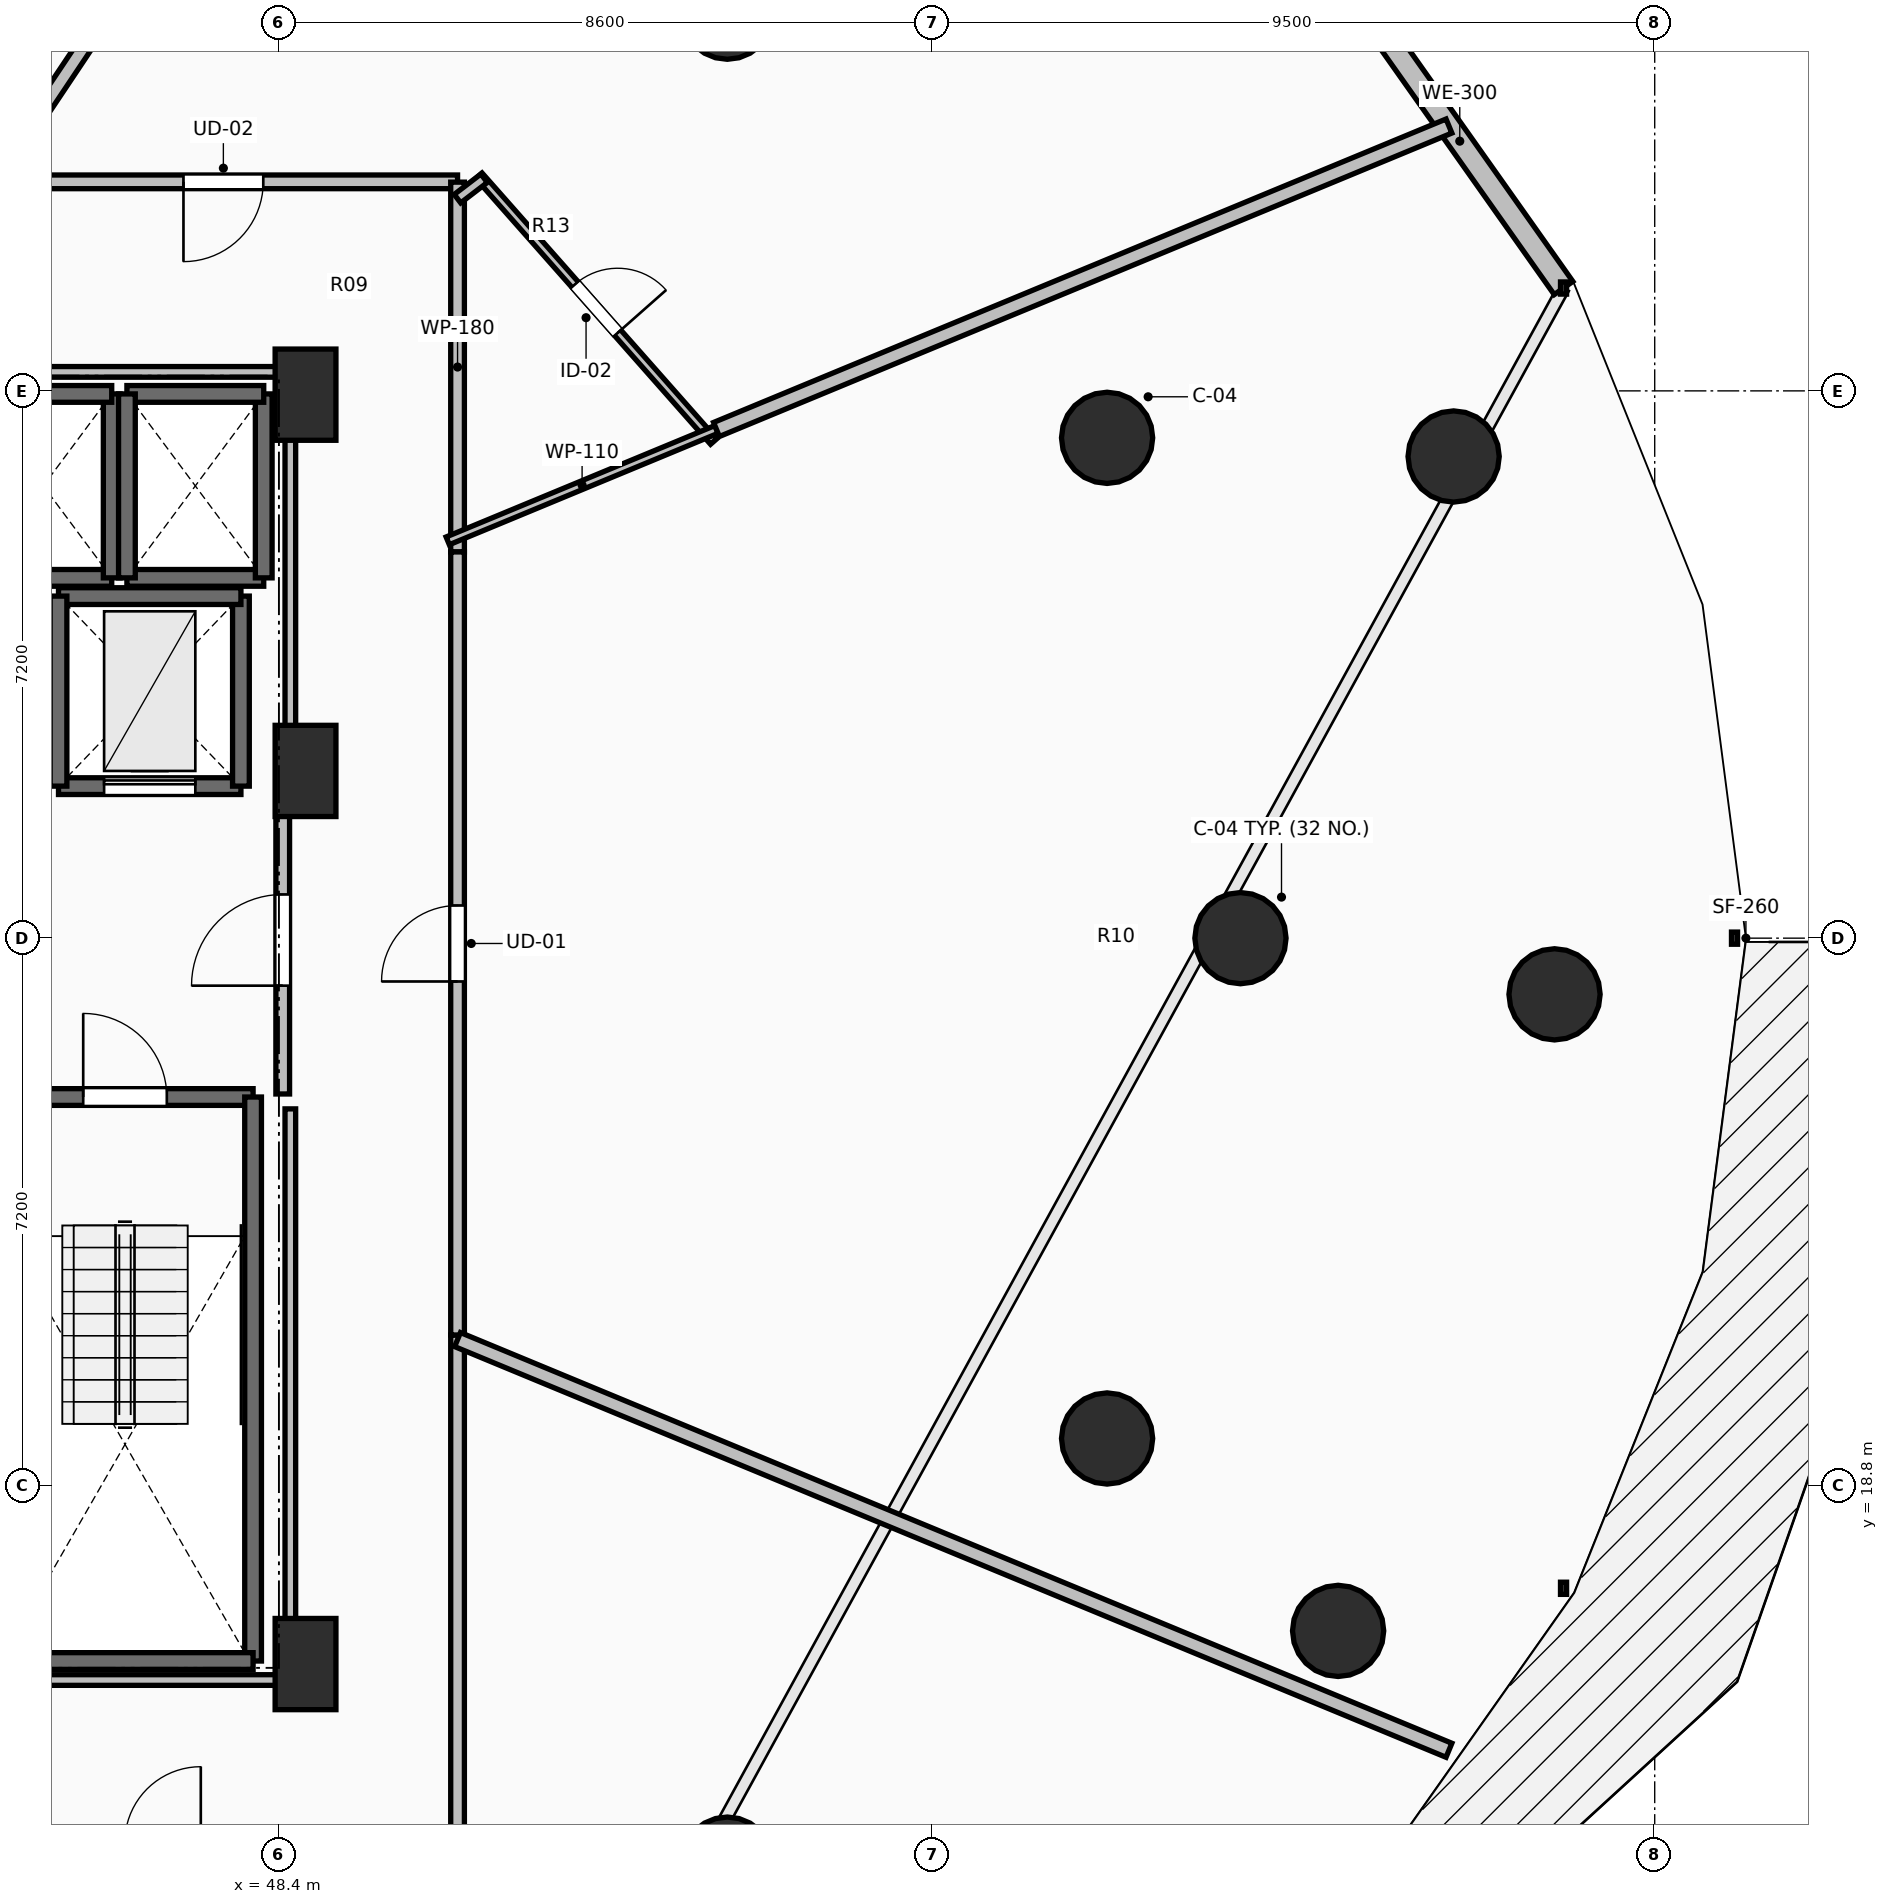
"""IFC4 building model, lengths in metres.
Left out: names, types, materials, properties, quantities, classifications, styles, units other than length and angle.
Written with IfcOpenShell. Run it as: python <this file> out.ifc"""

import sys

from ifc_helpers import new_model, si_unit, direction, frame, frame_2d, origin, origin_2d, place, context, subcontext, project, spatial, rectangle, circle, extrude, element, fill, save


model = new_model("IFC4")
c1 = context("Model", 3, precision=1e-05, world=origin(), true_north=direction((0.0, 1.0)))
c2 = subcontext(c1, "Body", "Model", "MODEL_VIEW")
j1 = project(units=[si_unit("LENGTHUNIT", "METRE"), si_unit("PLANEANGLEUNIT", "RADIAN")], contexts=[c1])
p1 = place(None, origin())
s1 = spatial("IfcSite", under=j1, at=p1, CompositionType="ELEMENT")
p2 = place(p1, origin())
s2 = spatial("IfcBuilding", under=s1, at=p2, CompositionType="ELEMENT")
p3 = place(p2, frame((0.0, 0.0, 48.5)))
s3 = spatial("IfcBuildingStorey", under=s2, at=p3, CompositionType="ELEMENT", Elevation=48.5)
for number, where, z_axis, x_axis in (
    (1, (61.05, 26.0, 0.0), (0.0, 0.0, 1.0), (1.0, 0.0, 0.0)),
    (2, (59.295, 32.582, 0.0), (0.0, 0.0, 1.0), (0.924, 0.383, 0.0)),
    (3, (54.299, 38.162, 0.0), (0.0, 0.0, 1.0), (0.707, 0.707, 0.0)),
    (4, (54.299, 13.838, 0.0), (0.0, 0.0, 1.0), (0.707, -0.707, 0.0)),
    (5, (59.295, 19.418, 0.0), (0.0, 0.0, 1.0), (0.924, -0.383, 0.0)),
    (6, (65.182, 25.261, 0.0), (0.0, 0.0, 1.0), (1.0, 0.0, 0.0)),
    (7, (63.854, 32.337, 0.0), (0.0, 0.0, 1.0), (0.924, 0.383, 0.0)),
    (8, (62.335, 16.886, 0.0), (0.0, 0.0, 1.0), (0.924, -0.383, 0.0)),
):
    element("IfcColumn", number, at=place(p3, frame(where, z_axis=z_axis, x_axis=x_axis)), inside=s3, PredefinedType="COLUMN", context=c2, shape_type="SweptSolid", body=[
        extrude(circle(Radius=0.6, at=origin_2d()), origin(), (0.0, 0.0, 1.0), 3.5),
    ])
for number, where, z_axis, x_axis in (
    (9, (48.75, 33.15, 0.0), (0.0, 0.0, 1.0), (1.0, 0.0, 0.0)),
    (10, (48.75, 28.2, 0.0), (0.0, 0.0, 1.0), (1.0, 0.0, 0.0)),
    (11, (48.75, 16.45, 0.0), (0.0, 0.0, 1.0), (1.0, 0.0, 0.0)),
):
    element("IfcColumn", number, at=place(p3, frame(where, z_axis=z_axis, x_axis=x_axis)), inside=s3, PredefinedType="PILASTER", context=c2, shape_type="SweptSolid", body=[
        extrude(rectangle(XDim=0.8, YDim=1.2, at=origin_2d()), origin(), (0.0, 0.0, 1.0), 3.5),
    ])
p4 = place(p3, frame((65.301, 34.553, 0.0), z_axis=(0.0, 0.0, 1.0), x_axis=(-0.577130815624, 0.816651713803, 0.0)))
e12 = element("IfcWall", 12, at=p4, inside=s3, PredefinedType="STANDARD", context=c2, shape_type="SweptSolid", body=[
    extrude(rectangle(XDim=4.731, YDim=0.3, at=frame_2d((2.366, 0.0))), origin(), (0.0, 0.0, 1.0), 3.24),
])
p5 = place(p3, frame((44.69, 23.91, 0.0), z_axis=(0.0, 0.0, 1.0), x_axis=(1.0, 0.0, 0.0)))
e13 = element("IfcWall", 13, at=p5, inside=s3, PredefinedType="SOLIDWALL", context=c2, shape_type="SweptSolid", body=[
    extrude(rectangle(XDim=3.37, YDim=0.22, at=frame_2d((1.685, 0.0))), origin(), (0.0, 0.0, 1.0), 3.24),
])
p6 = place(p5, frame((1.135, 0.0, 0.0)))
e14 = element("IfcOpeningElement", 14, at=p6, cuts=e13, PredefinedType="OPENING", context=c2, shape_type="SweptSolid", body=[
    extrude(rectangle(XDim=1.1, YDim=2.15, at=frame_2d((0.55, 1.075))), frame((0.0, 0.125, 0.0), z_axis=(0.0, -1.0, 0.0), x_axis=(1.0, 0.0, 0.0)), (0.0, 0.0, 1.0), 0.25),
])
p7 = place(p3, frame((48.06, 23.91, 0.0), z_axis=(0.0, 0.0, 1.0), x_axis=(0.0, -1.0, 0.0)))
e15 = element("IfcWall", 15, at=p7, inside=s3, PredefinedType="SOLIDWALL", context=c2, shape_type="SweptSolid", body=[
    extrude(rectangle(XDim=7.42, YDim=0.22, at=frame_2d((3.71, 0.0))), origin(), (0.0, 0.0, 1.0), 3.24),
])
p8 = place(p3, frame((48.06, 16.49, 0.0), z_axis=(0.0, 0.0, 1.0), x_axis=(-1.0, 0.0, 0.0)))
e16 = element("IfcWall", 16, at=p8, inside=s3, PredefinedType="SOLIDWALL", context=c2, shape_type="SweptSolid", body=[
    extrude(rectangle(XDim=3.37, YDim=0.22, at=frame_2d((1.685, 0.0))), origin(), (0.0, 0.0, 1.0), 3.24),
])
p9 = place(p3, frame((44.4, 30.74, 0.0), z_axis=(0.0, 0.0, 1.0), x_axis=(1.0, 0.0, 0.0)))
e17 = element("IfcWall", 17, at=p9, inside=s3, PredefinedType="SOLIDWALL", context=c2, shape_type="SweptSolid", body=[
    extrude(rectangle(XDim=1.8, YDim=0.22, at=frame_2d((0.9, 0.0))), origin(), (0.0, 0.0, 1.0), 3.24),
])
p10 = place(p3, frame((46.2, 30.74, 0.0), z_axis=(0.0, 0.0, 1.0), x_axis=(0.0, 1.0, 0.0)))
e18 = element("IfcWall", 18, at=p10, inside=s3, PredefinedType="SOLIDWALL", context=c2, shape_type="SweptSolid", body=[
    extrude(rectangle(XDim=2.42, YDim=0.22, at=frame_2d((1.21, 0.0))), origin(), (0.0, 0.0, 1.0), 3.24),
])
for number, where, z_axis, x_axis in (
    (19, (46.2, 33.16, 0.0), (0.0, 0.0, 1.0), (-1.0, 0.0, 0.0)),
    (20, (46.4, 30.74, 0.0), (0.0, 0.0, 1.0), (1.0, 0.0, 0.0)),
):
    element("IfcWall", number, at=place(p3, frame(where, z_axis=z_axis, x_axis=x_axis)), inside=s3, PredefinedType="SOLIDWALL", context=c2, shape_type="SweptSolid", body=[
        extrude(rectangle(XDim=1.8, YDim=0.22, at=frame_2d((0.9, 0.0))), origin(), (0.0, 0.0, 1.0), 3.24),
    ])
p11 = place(p3, frame((48.2, 30.74, 0.0), z_axis=(0.0, 0.0, 1.0), x_axis=(0.0, 1.0, 0.0)))
e21 = element("IfcWall", 21, at=p11, inside=s3, PredefinedType="SOLIDWALL", context=c2, shape_type="SweptSolid", body=[
    extrude(rectangle(XDim=2.42, YDim=0.22, at=frame_2d((1.21, 0.0))), origin(), (0.0, 0.0, 1.0), 3.24),
])
p12 = place(p3, frame((48.2, 33.16, 0.0), z_axis=(0.0, 0.0, 1.0), x_axis=(-1.0, 0.0, 0.0)))
e22 = element("IfcWall", 22, at=p12, inside=s3, PredefinedType="SOLIDWALL", context=c2, shape_type="SweptSolid", body=[
    extrude(rectangle(XDim=1.8, YDim=0.22, at=frame_2d((0.9, 0.0))), origin(), (0.0, 0.0, 1.0), 3.24),
])
p13 = place(p3, frame((46.4, 33.16, 0.0), z_axis=(0.0, 0.0, 1.0), x_axis=(0.0, -1.0, 0.0)))
e23 = element("IfcWall", 23, at=p13, inside=s3, PredefinedType="SOLIDWALL", context=c2, shape_type="SweptSolid", body=[
    extrude(rectangle(XDim=2.42, YDim=0.22, at=frame_2d((1.21, 0.0))), origin(), (0.0, 0.0, 1.0), 3.24),
])
p14 = place(p3, frame((45.5, 28.0, 0.0), z_axis=(0.0, 0.0, 1.0), x_axis=(1.0, 0.0, 0.0)))
e24 = element("IfcWall", 24, at=p14, inside=s3, PredefinedType="SHEAR", context=c2, shape_type="SweptSolid", body=[
    extrude(rectangle(XDim=2.4, YDim=0.22, at=frame_2d((1.2, 0.0))), origin(), (0.0, 0.0, 1.0), 3.24),
])
p15 = place(p14, frame((0.6, 0.0, 0.0)))
e25 = element("IfcOpeningElement", 25, at=p15, cuts=e24, PredefinedType="OPENING", context=c2, shape_type="SweptSolid", body=[
    extrude(rectangle(XDim=1.2, YDim=2.2, at=frame_2d((0.6, 1.1))), frame((0.0, 0.125, 0.0), z_axis=(0.0, -1.0, 0.0), x_axis=(1.0, 0.0, 0.0)), (0.0, 0.0, 1.0), 0.25),
])
p16 = place(p3, frame((47.9, 28.0, 0.0), z_axis=(0.0, 0.0, 1.0), x_axis=(0.0, 1.0, 0.0)))
e26 = element("IfcWall", 26, at=p16, inside=s3, PredefinedType="SHEAR", context=c2, shape_type="SweptSolid", body=[
    extrude(rectangle(XDim=2.5, YDim=0.22, at=frame_2d((1.25, 0.0))), origin(), (0.0, 0.0, 1.0), 3.24),
])
p17 = place(p3, frame((47.9, 30.5, 0.0), z_axis=(0.0, 0.0, 1.0), x_axis=(-1.0, 0.0, 0.0)))
e27 = element("IfcWall", 27, at=p17, inside=s3, PredefinedType="SHEAR", context=c2, shape_type="SweptSolid", body=[
    extrude(rectangle(XDim=2.4, YDim=0.22, at=frame_2d((1.2, 0.0))), origin(), (0.0, 0.0, 1.0), 3.24),
])
p18 = place(p3, frame((45.5, 30.5, 0.0), z_axis=(0.0, 0.0, 1.0), x_axis=(0.0, -1.0, 0.0)))
e28 = element("IfcWall", 28, at=p18, inside=s3, PredefinedType="SHEAR", context=c2, shape_type="SweptSolid", body=[
    extrude(rectangle(XDim=2.5, YDim=0.22, at=frame_2d((1.25, 0.0))), origin(), (0.0, 0.0, 1.0), 3.24),
])
p19 = place(p3, frame((48.45, 23.95, 0.0), z_axis=(0.0, 0.0, 1.0), x_axis=(0.0, 1.0, 0.0)))
e29 = element("IfcWall", 29, at=p19, inside=s3, PredefinedType="PARTITIONING", context=c2, shape_type="SweptSolid", body=[
    extrude(rectangle(XDim=4.05, YDim=0.18, at=frame_2d((2.025, 0.0))), origin(), (0.0, 0.0, 1.0), 3.24),
])
p20 = place(p19, frame((1.425, 0.0, 0.0)))
e30 = element("IfcOpeningElement", 30, at=p20, cuts=e29, PredefinedType="OPENING", context=c2, shape_type="SweptSolid", body=[
    extrude(rectangle(XDim=1.2, YDim=2.15, at=frame_2d((0.6, 1.075))), frame((0.0, 0.105, 0.0), z_axis=(0.0, -1.0, 0.0), x_axis=(1.0, 0.0, 0.0)), (0.0, 0.0, 1.0), 0.21),
])
p21 = place(p3, frame((50.75, 35.95, 0.0), z_axis=(0.0, 0.0, 1.0), x_axis=(-1.0, 0.0, 0.0)))
e31 = element("IfcWall", 31, at=p21, inside=s3, PredefinedType="PARTITIONING", context=c2, shape_type="SweptSolid", body=[
    extrude(rectangle(XDim=6.162, YDim=0.18, at=frame_2d((3.081, 0.0))), origin(), (0.0, 0.0, 1.0), 2.432),
])
p22 = place(p21, frame((2.556, 0.0, 0.0)))
e32 = element("IfcOpeningElement", 32, at=p22, cuts=e31, PredefinedType="OPENING", context=c2, shape_type="SweptSolid", body=[
    extrude(rectangle(XDim=1.05, YDim=2.2, at=frame_2d((0.525, 1.1))), frame((0.0, 0.105, 0.0), z_axis=(0.0, -1.0, 0.0), x_axis=(1.0, 0.0, 0.0)), (0.0, 0.0, 1.0), 0.21),
])
p23 = place(p3, frame((50.75, 31.081, 0.0), z_axis=(0.0, 0.0, 1.0), x_axis=(0.0, 1.0, 0.0)))
e33 = element("IfcWall", 33, at=p23, inside=s3, PredefinedType="PARTITIONING", context=c2, shape_type="SweptSolid", body=[
    extrude(rectangle(XDim=4.865, YDim=0.18, at=frame_2d((2.433, 0.0))), origin(), (0.0, 0.0, 1.0), 2.432),
])
p24 = place(p3, frame((50.75, 14.1, 0.0), z_axis=(0.0, 0.0, 1.0), x_axis=(0.0, 1.0, 0.0)))
e34 = element("IfcWall", 34, at=p24, inside=s3, PredefinedType="PARTITIONING", context=c2, shape_type="SweptSolid", body=[
    extrude(rectangle(XDim=6.679, YDim=0.18, at=frame_2d((3.339, 0.0))), origin(), (0.0, 0.0, 1.0), 2.432),
])
p25 = place(p3, frame((50.75, 20.779, 0.0), z_axis=(0.0, 0.0, 1.0), x_axis=(0.0, 1.0, 0.0)))
e35 = element("IfcWall", 35, at=p25, inside=s3, PredefinedType="PARTITIONING", context=c2, shape_type="SweptSolid", body=[
    extrude(rectangle(XDim=10.302, YDim=0.18, at=frame_2d((5.151, 0.0))), origin(), (0.0, 0.0, 1.0), 2.432),
])
p26 = place(p25, frame((4.651, 0.0, 0.0)))
e36 = element("IfcOpeningElement", 36, at=p26, cuts=e35, PredefinedType="OPENING", context=c2, shape_type="SweptSolid", body=[
    extrude(rectangle(XDim=1.0, YDim=2.15, at=frame_2d((0.5, 1.075))), frame((0.0, 0.105, 0.0), z_axis=(0.0, -1.0, 0.0), x_axis=(1.0, 0.0, 0.0)), (0.0, 0.0, 1.0), 0.21),
])
p27 = place(p3, frame((51.031, 36.03, 0.0), z_axis=(0.0, 0.0, 1.0), x_axis=(0.662106207726, -0.749410014405, 0.0)))
e37 = element("IfcWall", 37, at=p27, inside=s3, PredefinedType="PARTITIONING", context=c2, shape_type="SweptSolid", body=[
    extrude(rectangle(XDim=4.665, YDim=0.11, at=frame_2d((2.332, 0.0))), origin(), (0.0, 0.0, 1.0), 2.432),
])
p28 = place(p27, frame((1.907, 0.0, 0.0)))
e38 = element("IfcOpeningElement", 38, at=p28, cuts=e37, PredefinedType="OPENING", context=c2, shape_type="SweptSolid", body=[
    extrude(rectangle(XDim=0.85, YDim=2.1, at=frame_2d((0.425, 1.05))), frame((0.0, 0.07, 0.0), z_axis=(0.0, -1.0, 0.0), x_axis=(1.0, 0.0, 0.0)), (0.0, 0.0, 1.0), 0.14),
])
p29 = place(p3, frame((54.156, 32.693, 0.0), z_axis=(0.0, 0.0, 1.0), x_axis=(-0.923803754276, -0.382866326002, 0.0)))
e39 = element("IfcWall", 39, at=p29, inside=s3, PredefinedType="PARTITIONING", context=c2, shape_type="SweptSolid", body=[
    extrude(rectangle(XDim=3.827, YDim=0.11, at=frame_2d((1.914, 0.0))), origin(), (0.0, 0.0, 1.0), 2.432),
])
p30 = place(p3, frame((51.267, 45.856, 0.0), z_axis=(0.0, 0.0, 1.0), x_axis=(-0.55557946655, -0.831463442581, 0.0)))
e40 = element("IfcWall", 40, at=p30, inside=s3, PredefinedType="PARTITIONING", context=c2, shape_type="SweptSolid", body=[
    extrude(rectangle(XDim=11.914, YDim=0.2, at=frame_2d((5.957, 0.0))), origin(), (0.0, 0.0, 1.0), 2.432),
])
p31 = place(p3, frame((54.156, 32.692, 0.0), z_axis=(0.0, 0.0, 1.0), x_axis=(0.923866486063, 0.38271492776, 0.0)))
e41 = element("IfcWall", 41, at=p31, inside=s3, PredefinedType="PARTITIONING", context=c2, shape_type="SweptSolid", body=[
    extrude(rectangle(XDim=10.431, YDim=0.2, at=frame_2d((5.215, 0.0))), origin(), (0.0, 0.0, 1.0), 2.432),
])
p32 = place(p3, frame((63.793, 15.316, 0.0), z_axis=(0.0, 0.0, 1.0), x_axis=(-0.923866969846, 0.382713759914, 0.0)))
e42 = element("IfcWall", 42, at=p32, inside=s3, PredefinedType="PARTITIONING", context=c2, shape_type="SweptSolid", body=[
    extrude(rectangle(XDim=14.118, YDim=0.2, at=frame_2d((7.059, 0.0))), origin(), (0.0, 0.0, 1.0), 2.624),
])
p33 = place(p3, frame((44.34, 33.45, 0.0), z_axis=(0.0, 0.0, 1.0), x_axis=(1.0, 0.0, 0.0)))
e43 = element("IfcWall", 43, at=p33, inside=s3, PredefinedType="PARTITIONING", context=c2, shape_type="SweptSolid", body=[
    extrude(rectangle(XDim=4.21, YDim=0.14, at=frame_2d((2.105, 0.0))), origin(), (0.0, 0.0, 1.0), 2.432),
])
p34 = place(p3, frame((48.55, 33.45, 0.0), z_axis=(0.0, 0.0, 1.0), x_axis=(0.0, -1.0, 0.0)))
e44 = element("IfcWall", 44, at=p34, inside=s3, PredefinedType="PARTITIONING", context=c2, shape_type="SweptSolid", body=[
    extrude(rectangle(XDim=5.254, YDim=0.14, at=frame_2d((2.627, 0.0))), origin(), (0.0, 0.0, 1.0), 2.432),
])
p35 = place(p3, frame((48.55, 23.754, 0.0), z_axis=(0.0, 0.0, 1.0), x_axis=(0.0, -1.0, 0.0)))
e45 = element("IfcWall", 45, at=p35, inside=s3, PredefinedType="PARTITIONING", context=c2, shape_type="SweptSolid", body=[
    extrude(rectangle(XDim=7.514, YDim=0.14, at=frame_2d((3.757, 0.0))), origin(), (0.0, 0.0, 1.0), 2.432),
])
p36 = place(p3, frame((48.55, 16.24, 0.0), z_axis=(0.0, 0.0, 1.0), x_axis=(-1.0, 0.0, 0.0)))
e46 = element("IfcWall", 46, at=p36, inside=s3, PredefinedType="PARTITIONING", context=c2, shape_type="SweptSolid", body=[
    extrude(rectangle(XDim=3.745, YDim=0.14, at=frame_2d((1.873, 0.0))), origin(), (0.0, 0.0, 1.0), 2.432),
])
p37 = place(p3, frame((51.099, 35.997, 0.0), z_axis=(0.0, 0.0, 1.0), x_axis=(-0.794185002189, -0.607676050456, 0.0)))
e47 = element("IfcWall", 47, at=p37, inside=s3, PredefinedType="PARTITIONING", context=c2, shape_type="SweptSolid", body=[
    extrude(rectangle(XDim=0.441, YDim=0.14, at=frame_2d((0.221, 0.0))), origin(), (0.0, 0.0, 1.0), 2.886),
])
p38 = place(p6, origin())
e48 = element("IfcDoor", 48, at=p38, inside=s3, OperationType="SINGLE_SWING_LEFT", PredefinedType="DOOR", context=c2, shape_type="SweptSolid", body=[
    extrude(rectangle(XDim=1.1, YDim=2.15, at=frame_2d((0.55, 1.075))), frame((0.0, 0.025, 0.0), z_axis=(0.0, -1.0, 0.0), x_axis=(1.0, 0.0, 0.0)), (0.0, 0.0, 1.0), 0.05),
])
fill(e14, e48)
p39 = place(p15, origin())
e49 = element("IfcDoor", 49, at=p39, inside=s3, OperationType="SLIDING_TO_LEFT", PredefinedType="DOOR", context=c2, shape_type="SweptSolid", body=[
    extrude(rectangle(XDim=1.2, YDim=2.2, at=frame_2d((0.6, 1.1))), frame((0.0, 0.025, 0.0), z_axis=(0.0, -1.0, 0.0), x_axis=(1.0, 0.0, 0.0)), (0.0, 0.0, 1.0), 0.05),
])
fill(e25, e49)
p40 = place(p20, origin())
e50 = element("IfcDoor", 50, at=p40, inside=s3, OperationType="SINGLE_SWING_LEFT", PredefinedType="DOOR", context=c2, shape_type="SweptSolid", body=[
    extrude(rectangle(XDim=1.2, YDim=2.15, at=frame_2d((0.6, 1.075))), frame((0.0, 0.025, 0.0), z_axis=(0.0, -1.0, 0.0), x_axis=(1.0, 0.0, 0.0)), (0.0, 0.0, 1.0), 0.05),
])
fill(e30, e50)
p41 = place(p22, origin())
e51 = element("IfcDoor", 51, at=p41, inside=s3, OperationType="SINGLE_SWING_RIGHT", PredefinedType="DOOR", context=c2, shape_type="SweptSolid", body=[
    extrude(rectangle(XDim=1.05, YDim=2.2, at=frame_2d((0.525, 1.1))), frame((0.0, 0.025, 0.0), z_axis=(0.0, -1.0, 0.0), x_axis=(1.0, 0.0, 0.0)), (0.0, 0.0, 1.0), 0.05),
])
fill(e32, e51)
p42 = place(p26, origin())
e52 = element("IfcDoor", 52, at=p42, inside=s3, OperationType="SINGLE_SWING_LEFT", PredefinedType="DOOR", context=c2, shape_type="SweptSolid", body=[
    extrude(rectangle(XDim=1.0, YDim=2.15, at=frame_2d((0.5, 1.075))), frame((0.0, 0.025, 0.0), z_axis=(0.0, -1.0, 0.0), x_axis=(1.0, 0.0, 0.0)), (0.0, 0.0, 1.0), 0.05),
])
fill(e36, e52)
p43 = place(p28, origin())
e53 = element("IfcDoor", 53, at=p43, inside=s3, OperationType="SINGLE_SWING_RIGHT", PredefinedType="DOOR", context=c2, shape_type="SweptSolid", body=[
    extrude(rectangle(XDim=0.85, YDim=2.1, at=frame_2d((0.425, 1.05))), frame((0.0, 0.025, 0.0), z_axis=(0.0, -1.0, 0.0), x_axis=(1.0, 0.0, 0.0)), (0.0, 0.0, 1.0), 0.05),
])
fill(e38, e53)
save(model, sys.argv[1])
